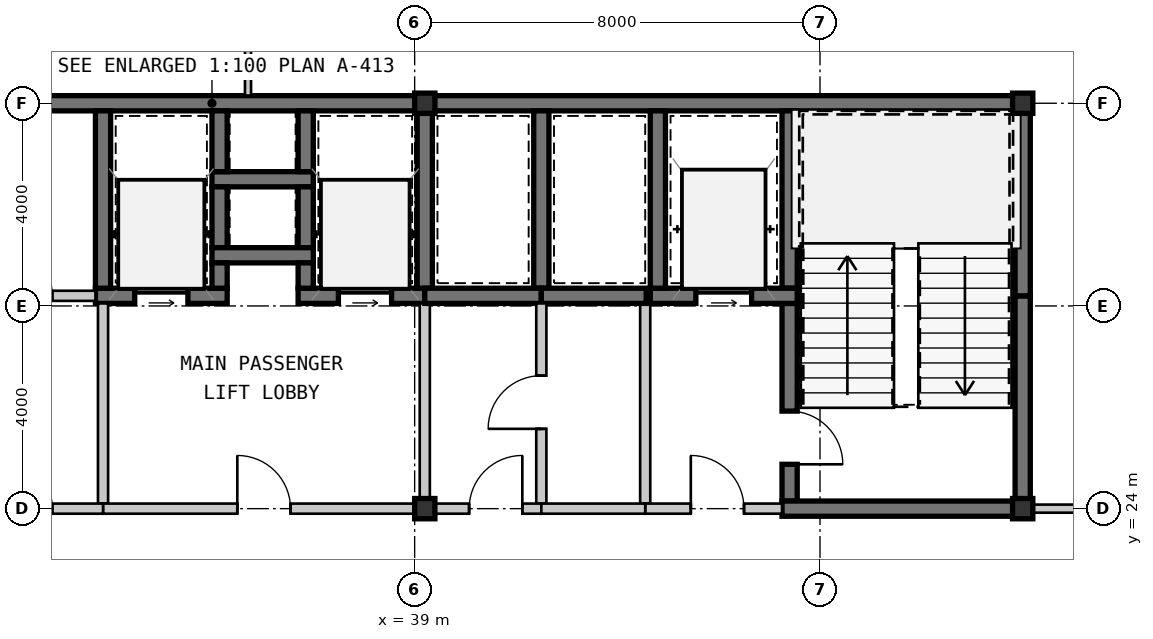
"""IFC4 building model, lengths in metres.
Left out: names, types, materials, properties, quantities, classifications, styles, units other than length and angle.
Written with IfcOpenShell. Run it as: python <this file> out.ifc"""

import sys

from ifc_helpers import new_model, si_unit, direction, frame, frame_2d, origin, origin_2d, place, context, subcontext, project, spatial, rectangle, hollow_rectangle, extrude, source, transform, mapped, element, fill, save


model = new_model("IFC4")
c1 = context("Model", 3, precision=1e-05, world=origin(), true_north=direction((0.0, 1.0)))
c2 = subcontext(c1, "Body", "Model", "MODEL_VIEW")
j1 = project(units=[si_unit("LENGTHUNIT", "METRE"), si_unit("PLANEANGLEUNIT", "RADIAN")], contexts=[c1])
p1 = place(None, origin())
s1 = spatial("IfcSite", under=j1, at=p1, CompositionType="ELEMENT")
p2 = place(p1, origin())
s2 = spatial("IfcBuilding", under=s1, at=p2, CompositionType="ELEMENT")
p3 = place(p2, frame((0.0, 0.0, 120.4)))
s3 = spatial("IfcBuildingStorey", under=s2, at=p3, CompositionType="ELEMENT", Elevation=120.4)
m1 = source(origin(), c2, "Body", "SweptSolid", [
    extrude(hollow_rectangle(XDim=0.4, YDim=0.4, WallThickness=0.016, at=origin_2d()), origin(), (0.0, 0.0, 1.0), 3.15),
])
for number, where, z_axis, x_axis in (
    (1, (39.2, 24.0, 0.0), (0.0, 0.0, 1.0), (1.0, 0.0, 0.0)),
    (2, (51.0, 24.0, 0.0), (0.0, 0.0, 1.0), (1.0, 0.0, 0.0)),
    (3, (39.2, 32.0, 0.0), (0.0, 0.0, 1.0), (1.0, 0.0, 0.0)),
    (4, (51.0, 32.0, 0.0), (0.0, 0.0, 1.0), (1.0, 0.0, 0.0)),
):
    element("IfcColumn", number, at=place(p3, frame(where, z_axis=z_axis, x_axis=x_axis)), inside=s3, PredefinedType="COLUMN", context=c2, shape_type="MappedRepresentation", body=[
        mapped(m1, transform((0.0, 0.0, 0.0), scale=1.0)),
    ])
m2 = source(origin(), c2, "Body", "SweptSolid", [
    extrude(rectangle(XDim=11.2, YDim=0.3, at=frame_2d((5.6, 0.0))), origin(), (0.0, 0.0, 1.0), 2.93),
])
p4 = place(p3, frame((28.0, 32.0, 0.0), z_axis=(0.0, 0.0, 1.0), x_axis=(1.0, 0.0, 0.0)))
e5 = element("IfcWall", 5, at=p4, inside=s3, PredefinedType="SHEAR", context=c2, shape_type="MappedRepresentation", body=[
    mapped(m2, transform((0.0, 0.0, 0.0), scale=1.0)),
])
m3 = source(origin(), c2, "Body", "SweptSolid", [
    extrude(rectangle(XDim=11.95, YDim=0.3, at=frame_2d((5.975, 0.0))), origin(), (0.0, 0.0, 1.0), 2.93),
])
p5 = place(p3, frame((39.2, 32.0, 0.0), z_axis=(0.0, 0.0, 1.0), x_axis=(1.0, 0.0, 0.0)))
e6 = element("IfcWall", 6, at=p5, inside=s3, PredefinedType="SHEAR", context=c2, shape_type="MappedRepresentation", body=[
    mapped(m3, transform((0.0, 0.0, 0.0), scale=1.0)),
])
m4 = source(origin(), c2, "Body", "SweptSolid", [
    extrude(rectangle(XDim=4.05, YDim=0.3, at=frame_2d((2.025, 0.0))), origin(), (0.0, 0.0, 1.0), 2.93),
])
p6 = place(p3, frame((51.0, 24.15, 0.0), z_axis=(0.0, 0.0, 1.0), x_axis=(0.0, 1.0, 0.0)))
e7 = element("IfcWall", 7, at=p6, inside=s3, PredefinedType="SHEAR", context=c2, shape_type="MappedRepresentation", body=[
    mapped(m4, transform((0.0, 0.0, 0.0), scale=1.0)),
])
m5 = source(origin(), c2, "Body", "SweptSolid", [
    extrude(rectangle(XDim=3.65, YDim=0.3, at=frame_2d((1.825, 0.0))), origin(), (0.0, 0.0, 1.0), 2.93),
])
p7 = place(p3, frame((51.0, 28.2, 0.0), z_axis=(0.0, 0.0, 1.0), x_axis=(0.0, 1.0, 0.0)))
e8 = element("IfcWall", 8, at=p7, inside=s3, PredefinedType="SHEAR", context=c2, shape_type="MappedRepresentation", body=[
    mapped(m5, transform((0.0, 0.0, 0.0), scale=1.0)),
])
m6 = source(origin(), c2, "Body", "SweptSolid", [
    extrude(rectangle(XDim=3.5, YDim=0.3, at=frame_2d((1.75, 0.0))), origin(), (0.0, 0.0, 1.0), 2.93),
])
p8 = place(p3, frame((46.4, 31.85, 0.0), z_axis=(0.0, 0.0, 1.0), x_axis=(0.0, -1.0, 0.0)))
e9 = element("IfcWall", 9, at=p8, inside=s3, PredefinedType="SHEAR", context=c2, shape_type="MappedRepresentation", body=[
    mapped(m6, transform((0.0, 0.0, 0.0), scale=1.0)),
])
m7 = source(origin(), c2, "Body", "SweptSolid", [
    extrude(rectangle(XDim=3.9, YDim=0.3, at=frame_2d((1.95, 0.0))), origin(), (0.0, 0.0, 1.0), 2.93),
])
p9 = place(p3, frame((46.4, 28.05, 0.0), z_axis=(0.0, 0.0, 1.0), x_axis=(0.0, -1.0, 0.0)))
e10 = element("IfcWall", 10, at=p9, inside=s3, PredefinedType="SHEAR", context=c2, shape_type="MappedRepresentation", body=[
    mapped(m7, transform((0.0, 0.0, 0.0), scale=1.0)),
])
m8 = source(origin(), c2, "Body", "SweptSolid", [
    extrude(rectangle(XDim=1.05, YDim=2.1, at=frame_2d((0.525, 1.05))), frame((0.0, 0.16, 0.0), z_axis=(0.0, -1.0, 0.0), x_axis=(1.0, 0.0, 0.0)), (0.0, 0.0, 1.0), 0.32),
])
p10 = place(p9, frame((2.125, 0.0, 0.0)))
e11 = element("IfcOpeningElement", 11, at=p10, cuts=e10, PredefinedType="OPENING", context=c2, shape_type="MappedRepresentation", body=[
    mapped(m8, transform((0.0, 0.0, 0.0), scale=1.0)),
])
m9 = source(origin(), c2, "Body", "SweptSolid", [
    extrude(rectangle(XDim=4.9, YDim=0.3, at=frame_2d((2.45, 0.0))), origin(), (0.0, 0.0, 1.0), 2.93),
])
p11 = place(p3, frame((46.25, 24.0, 0.0), z_axis=(0.0, 0.0, 1.0), x_axis=(1.0, 0.0, 0.0)))
e12 = element("IfcWall", 12, at=p11, inside=s3, PredefinedType="SHEAR", context=c2, shape_type="MappedRepresentation", body=[
    mapped(m9, transform((0.0, 0.0, 0.0), scale=1.0)),
])
m10 = source(origin(), c2, "Body", "SweptSolid", [
    extrude(rectangle(XDim=2.9, YDim=0.3, at=frame_2d((1.45, 0.0))), origin(), (0.0, 0.0, 1.0), 2.93),
])
p12 = place(p3, frame((43.65, 28.2, 0.0), z_axis=(0.0, 0.0, 1.0), x_axis=(1.0, 0.0, 0.0)))
e13 = element("IfcWall", 13, at=p12, inside=s3, PredefinedType="SHEAR", context=c2, shape_type="MappedRepresentation", body=[
    mapped(m10, transform((0.0, 0.0, 0.0), scale=1.0)),
])
m11 = source(origin(), c2, "Body", "SweptSolid", [
    extrude(rectangle(XDim=1.1, YDim=2.15, at=frame_2d((0.55, 1.075))), frame((0.0, 0.16, 0.0), z_axis=(0.0, -1.0, 0.0), x_axis=(1.0, 0.0, 0.0)), (0.0, 0.0, 1.0), 0.32),
])
p13 = place(p12, frame((0.9, 0.0, 0.0)))
e14 = element("IfcOpeningElement", 14, at=p13, cuts=e13, PredefinedType="OPENING", context=c2, shape_type="MappedRepresentation", body=[
    mapped(m11, transform((0.0, 0.0, 0.0), scale=1.0)),
])
p14 = place(p3, frame((43.8, 31.85, 0.0), z_axis=(0.0, 0.0, 1.0), x_axis=(0.0, -1.0, 0.0)))
e15 = element("IfcWall", 15, at=p14, inside=s3, PredefinedType="SHEAR", context=c2, shape_type="MappedRepresentation", body=[
    mapped(m6, transform((0.0, 0.0, 0.0), scale=1.0)),
])
m12 = source(origin(), c2, "Body", "SweptSolid", [
    extrude(rectangle(XDim=3.95, YDim=0.2, at=frame_2d((1.975, 0.0))), origin(), (0.0, 0.0, 1.0), 2.93),
])
p15 = place(p3, frame((43.55, 28.05, 0.0), z_axis=(0.0, 0.0, 1.0), x_axis=(0.0, -1.0, 0.0)))
e16 = element("IfcWall", 16, at=p15, inside=s3, PredefinedType="SOLIDWALL", context=c2, shape_type="MappedRepresentation", body=[
    mapped(m12, transform((0.0, 0.0, 0.0), scale=1.0)),
])
m13 = source(origin(), c2, "Body", "SweptSolid", [
    extrude(rectangle(XDim=2.7, YDim=0.2, at=frame_2d((1.35, 0.0))), origin(), (0.0, 0.0, 1.0), 2.397),
])
p16 = place(p3, frame((43.55, 24.0, 0.0), z_axis=(0.0, 0.0, 1.0), x_axis=(1.0, 0.0, 0.0)))
e17 = element("IfcWall", 17, at=p16, inside=s3, PredefinedType="SOLIDWALL", context=c2, shape_type="MappedRepresentation", body=[
    mapped(m13, transform((0.0, 0.0, 0.0), scale=1.0)),
])
m14 = source(origin(), c2, "Body", "SweptSolid", [
    extrude(rectangle(XDim=1.05, YDim=2.1, at=frame_2d((0.525, 1.05))), frame((0.0, 0.11, 0.0), z_axis=(0.0, -1.0, 0.0), x_axis=(1.0, 0.0, 0.0)), (0.0, 0.0, 1.0), 0.22),
])
p17 = place(p16, frame((0.9, 0.0, 0.0)))
e18 = element("IfcOpeningElement", 18, at=p17, cuts=e17, PredefinedType="OPENING", context=c2, shape_type="MappedRepresentation", body=[
    mapped(m14, transform((0.0, 0.0, 0.0), scale=1.0)),
])
m15 = source(origin(), c2, "Body", "SweptSolid", [
    extrude(rectangle(XDim=2.0, YDim=0.3, at=frame_2d((1.0, 0.0))), origin(), (0.0, 0.0, 1.0), 2.93),
])
p18 = place(p3, frame((35.0, 30.5, 0.0), z_axis=(0.0, 0.0, 1.0), x_axis=(1.0, 0.0, 0.0)))
e19 = element("IfcWall", 19, at=p18, inside=s3, PredefinedType="SHEAR", context=c2, shape_type="MappedRepresentation", body=[
    mapped(m15, transform((0.0, 0.0, 0.0), scale=1.0)),
])
m16 = source(origin(), c2, "Body", "SweptSolid", [
    extrude(rectangle(XDim=1.2, YDim=0.3, at=frame_2d((0.6, 0.0))), origin(), (0.0, 0.0, 1.0), 2.93),
])
for number, where, z_axis, x_axis in (
    (20, (35.15, 31.85, 0.0), (0.0, 0.0, 1.0), (0.0, -1.0, 0.0)),
    (21, (36.85, 30.65, 0.0), (0.0, 0.0, 1.0), (0.0, 1.0, 0.0)),
    (22, (35.15, 30.35, 0.0), (0.0, 0.0, 1.0), (0.0, -1.0, 0.0)),
    (23, (36.85, 29.15, 0.0), (0.0, 0.0, 1.0), (0.0, 1.0, 0.0)),
):
    element("IfcWall", number, at=place(p3, frame(where, z_axis=z_axis, x_axis=x_axis)), inside=s3, PredefinedType="SHEAR", context=c2, shape_type="MappedRepresentation", body=[
        mapped(m16, transform((0.0, 0.0, 0.0), scale=1.0)),
    ])
p19 = place(p3, frame((35.0, 29.0, 0.0), z_axis=(0.0, 0.0, 1.0), x_axis=(1.0, 0.0, 0.0)))
e24 = element("IfcWall", 24, at=p19, inside=s3, PredefinedType="SHEAR", context=c2, shape_type="MappedRepresentation", body=[
    mapped(m15, transform((0.0, 0.0, 0.0), scale=1.0)),
])
m17 = source(origin(), c2, "Body", "SweptSolid", [
    extrude(rectangle(XDim=2.6, YDim=0.3, at=frame_2d((1.3, 0.0))), origin(), (0.0, 0.0, 1.0), 2.93),
])
p20 = place(p3, frame((32.7, 28.2, 0.0), z_axis=(0.0, 0.0, 1.0), x_axis=(1.0, 0.0, 0.0)))
e25 = element("IfcWall", 25, at=p20, inside=s3, PredefinedType="SHEAR", context=c2, shape_type="MappedRepresentation", body=[
    mapped(m17, transform((0.0, 0.0, 0.0), scale=1.0)),
])
m18 = source(origin(), c2, "Body", "SweptSolid", [
    extrude(rectangle(XDim=1.05, YDim=2.15, at=frame_2d((0.525, 1.075))), frame((0.0, 0.16, 0.0), z_axis=(0.0, -1.0, 0.0), x_axis=(1.0, 0.0, 0.0)), (0.0, 0.0, 1.0), 0.32),
])
p21 = place(p20, frame((0.775, 0.0, 0.0)))
e26 = element("IfcOpeningElement", 26, at=p21, cuts=e25, PredefinedType="OPENING", context=c2, shape_type="MappedRepresentation", body=[
    mapped(m18, transform((0.0, 0.0, 0.0), scale=1.0)),
])
m19 = source(origin(), c2, "Body", "SweptSolid", [
    extrude(rectangle(XDim=0.5, YDim=0.3, at=frame_2d((0.25, 0.0))), origin(), (0.0, 0.0, 1.0), 2.93),
])
p22 = place(p3, frame((35.15, 28.35, 0.0), z_axis=(0.0, 0.0, 1.0), x_axis=(0.0, 1.0, 0.0)))
e27 = element("IfcWall", 27, at=p22, inside=s3, PredefinedType="SHEAR", context=c2, shape_type="MappedRepresentation", body=[
    mapped(m19, transform((0.0, 0.0, 0.0), scale=1.0)),
])
p23 = place(p3, frame((32.85, 31.85, 0.0), z_axis=(0.0, 0.0, 1.0), x_axis=(0.0, -1.0, 0.0)))
e28 = element("IfcWall", 28, at=p23, inside=s3, PredefinedType="SHEAR", context=c2, shape_type="MappedRepresentation", body=[
    mapped(m6, transform((0.0, 0.0, 0.0), scale=1.0)),
])
m20 = source(origin(), c2, "Body", "SweptSolid", [
    extrude(rectangle(XDim=2.5, YDim=0.3, at=frame_2d((1.25, 0.0))), origin(), (0.0, 0.0, 1.0), 2.93),
])
p24 = place(p3, frame((36.7, 28.2, 0.0), z_axis=(0.0, 0.0, 1.0), x_axis=(1.0, 0.0, 0.0)))
e29 = element("IfcWall", 29, at=p24, inside=s3, PredefinedType="SHEAR", context=c2, shape_type="MappedRepresentation", body=[
    mapped(m20, transform((0.0, 0.0, 0.0), scale=1.0)),
])
p25 = place(p24, frame((0.795, 0.0, 0.0)))
e30 = element("IfcOpeningElement", 30, at=p25, cuts=e29, PredefinedType="OPENING", context=c2, shape_type="MappedRepresentation", body=[
    mapped(m18, transform((0.0, 0.0, 0.0), scale=1.0)),
])
p26 = place(p3, frame((36.85, 28.85, 0.0), z_axis=(0.0, 0.0, 1.0), x_axis=(0.0, -1.0, 0.0)))
e31 = element("IfcWall", 31, at=p26, inside=s3, PredefinedType="SHEAR", context=c2, shape_type="MappedRepresentation", body=[
    mapped(m19, transform((0.0, 0.0, 0.0), scale=1.0)),
])
p27 = place(p3, frame((39.2, 28.35, 0.0), z_axis=(0.0, 0.0, 1.0), x_axis=(0.0, 1.0, 0.0)))
e32 = element("IfcWall", 32, at=p27, inside=s3, PredefinedType="SHEAR", context=c2, shape_type="MappedRepresentation", body=[
    mapped(m6, transform((0.0, 0.0, 0.0), scale=1.0)),
])
p28 = place(p3, frame((32.85, 24.1, 0.0), z_axis=(0.0, 0.0, 1.0), x_axis=(0.0, 1.0, 0.0)))
e33 = element("IfcWall", 33, at=p28, inside=s3, PredefinedType="SOLIDWALL", context=c2, shape_type="MappedRepresentation", body=[
    mapped(m12, transform((0.0, 0.0, 0.0), scale=1.0)),
])
m21 = source(origin(), c2, "Body", "SweptSolid", [
    extrude(rectangle(XDim=3.95, YDim=0.2, at=frame_2d((1.975, 0.0))), origin(), (0.0, 0.0, 1.0), 2.47),
])
p29 = place(p3, frame((39.2, 28.05, 0.0), z_axis=(0.0, 0.0, 1.0), x_axis=(0.0, -1.0, 0.0)))
e34 = element("IfcWall", 34, at=p29, inside=s3, PredefinedType="SOLIDWALL", context=c2, shape_type="MappedRepresentation", body=[
    mapped(m21, transform((0.0, 0.0, 0.0), scale=1.0)),
])
m22 = source(origin(), c2, "Body", "SweptSolid", [
    extrude(rectangle(XDim=6.35, YDim=0.2, at=frame_2d((3.175, 0.0))), origin(), (0.0, 0.0, 1.0), 2.47),
])
p30 = place(p3, frame((39.2, 24.0, 0.0), z_axis=(0.0, 0.0, 1.0), x_axis=(-1.0, 0.0, 0.0)))
e35 = element("IfcWall", 35, at=p30, inside=s3, PredefinedType="SOLIDWALL", context=c2, shape_type="MappedRepresentation", body=[
    mapped(m22, transform((0.0, 0.0, 0.0), scale=1.0)),
])
p31 = place(p30, frame((2.65, 0.0, 0.0)))
e36 = element("IfcOpeningElement", 36, at=p31, cuts=e35, PredefinedType="OPENING", context=c2, shape_type="MappedRepresentation", body=[
    mapped(m14, transform((0.0, 0.0, 0.0), scale=1.0)),
])
p32 = place(p3, frame((41.5, 28.35, 0.0), z_axis=(0.0, 0.0, 1.0), x_axis=(0.0, 1.0, 0.0)))
e37 = element("IfcWall", 37, at=p32, inside=s3, PredefinedType="SHEAR", context=c2, shape_type="MappedRepresentation", body=[
    mapped(m6, transform((0.0, 0.0, 0.0), scale=1.0)),
])
m23 = source(origin(), c2, "Body", "SweptSolid", [
    extrude(rectangle(XDim=2.3, YDim=0.3, at=frame_2d((1.15, 0.0))), origin(), (0.0, 0.0, 1.0), 2.93),
])
p33 = place(p3, frame((39.2, 28.2, 0.0), z_axis=(0.0, 0.0, 1.0), x_axis=(1.0, 0.0, 0.0)))
e38 = element("IfcWall", 38, at=p33, inside=s3, PredefinedType="SHEAR", context=c2, shape_type="MappedRepresentation", body=[
    mapped(m23, transform((0.0, 0.0, 0.0), scale=1.0)),
])
m24 = source(origin(), c2, "Body", "SweptSolid", [
    extrude(rectangle(XDim=2.07, YDim=0.3, at=frame_2d((1.035, 0.0))), origin(), (0.0, 0.0, 1.0), 2.93),
])
p34 = place(p3, frame((41.5, 28.2, 0.0), z_axis=(0.0, 0.0, 1.0), x_axis=(1.0, 0.0, 0.0)))
e39 = element("IfcWall", 39, at=p34, inside=s3, PredefinedType="SHEAR", context=c2, shape_type="MappedRepresentation", body=[
    mapped(m24, transform((0.0, 0.0, 0.0), scale=1.0)),
])
m25 = source(origin(), c2, "Body", "SweptSolid", [
    extrude(rectangle(XDim=2.9, YDim=0.2, at=frame_2d((1.45, 0.0))), origin(), (0.0, 0.0, 1.0), 2.93),
])
p35 = place(p3, frame((29.8, 28.2, 0.0), z_axis=(0.0, 0.0, 1.0), x_axis=(1.0, 0.0, 0.0)))
e40 = element("IfcWall", 40, at=p35, inside=s3, PredefinedType="SOLIDWALL", context=c2, shape_type="MappedRepresentation", body=[
    mapped(m25, transform((0.0, 0.0, 0.0), scale=1.0)),
])
p36 = place(p35, frame((1.0, 0.0, 0.0)))
e41 = element("IfcOpeningElement", 41, at=p36, cuts=e40, PredefinedType="OPENING", context=c2, shape_type="MappedRepresentation", body=[
    mapped(m14, transform((0.0, 0.0, 0.0), scale=1.0)),
])
m26 = source(origin(), c2, "Body", "SweptSolid", [
    extrude(rectangle(XDim=3.05, YDim=0.2, at=frame_2d((1.525, 0.0))), origin(), (0.0, 0.0, 1.0), 2.47),
])
p37 = place(p3, frame((32.85, 24.0, 0.0), z_axis=(0.0, 0.0, 1.0), x_axis=(-1.0, 0.0, 0.0)))
e42 = element("IfcWall", 42, at=p37, inside=s3, PredefinedType="SOLIDWALL", context=c2, shape_type="MappedRepresentation", body=[
    mapped(m26, transform((0.0, 0.0, 0.0), scale=1.0)),
])
p38 = place(p37, frame((1.0, 0.0, 0.0)))
e43 = element("IfcOpeningElement", 43, at=p38, cuts=e42, PredefinedType="OPENING", context=c2, shape_type="MappedRepresentation", body=[
    mapped(m14, transform((0.0, 0.0, 0.0), scale=1.0)),
])
p39 = place(p3, frame((41.5, 28.05, 0.0), z_axis=(0.0, 0.0, 1.0), x_axis=(0.0, -1.0, 0.0)))
e44 = element("IfcWall", 44, at=p39, inside=s3, PredefinedType="SOLIDWALL", context=c2, shape_type="MappedRepresentation", body=[
    mapped(m12, transform((0.0, 0.0, 0.0), scale=1.0)),
])
p40 = place(p39, frame((1.425, 0.0, 0.0)))
e45 = element("IfcOpeningElement", 45, at=p40, cuts=e44, PredefinedType="OPENING", context=c2, shape_type="MappedRepresentation", body=[
    mapped(m14, transform((0.0, 0.0, 0.0), scale=1.0)),
])
m27 = source(origin(), c2, "Body", "SweptSolid", [
    extrude(rectangle(XDim=2.3, YDim=0.2, at=frame_2d((1.15, 0.0))), origin(), (0.0, 0.0, 1.0), 2.397),
])
p41 = place(p3, frame((41.5, 24.0, 0.0), z_axis=(0.0, 0.0, 1.0), x_axis=(-1.0, 0.0, 0.0)))
e46 = element("IfcWall", 46, at=p41, inside=s3, PredefinedType="SOLIDWALL", context=c2, shape_type="MappedRepresentation", body=[
    mapped(m27, transform((0.0, 0.0, 0.0), scale=1.0)),
])
p42 = place(p41, frame((0.375, 0.0, 0.0)))
e47 = element("IfcOpeningElement", 47, at=p42, cuts=e46, PredefinedType="OPENING", context=c2, shape_type="MappedRepresentation", body=[
    mapped(m14, transform((0.0, 0.0, 0.0), scale=1.0)),
])
m28 = source(origin(), c2, "Body", "SweptSolid", [
    extrude(rectangle(XDim=2.05, YDim=0.2, at=frame_2d((1.025, 0.0))), origin(), (0.0, 0.0, 1.0), 2.397),
])
p43 = place(p3, frame((43.55, 24.0, 0.0), z_axis=(0.0, 0.0, 1.0), x_axis=(-1.0, 0.0, 0.0)))
e48 = element("IfcWall", 48, at=p43, inside=s3, PredefinedType="SOLIDWALL", context=c2, shape_type="MappedRepresentation", body=[
    mapped(m28, transform((0.0, 0.0, 0.0), scale=1.0)),
])
m29 = source(origin(), c2, "Body", "SweptSolid", [
    extrude(rectangle(XDim=10.1, YDim=0.16, at=frame_2d((5.05, 0.0))), origin(), (0.0, 0.0, 1.0), 2.93),
])
p44 = place(p3, frame((51.15, 24.0, 0.0), z_axis=(0.0, 0.0, 1.0), x_axis=(1.0, 0.0, 0.0)))
e49 = element("IfcWall", 49, at=p44, inside=s3, PredefinedType="PARTITIONING", context=c2, shape_type="MappedRepresentation", body=[
    mapped(m29, transform((0.0, 0.0, 0.0), scale=1.0)),
])
m30 = source(origin(), c2, "Body", "SweptSolid", [
    extrude(rectangle(XDim=0.92, YDim=2.1, at=frame_2d((0.46, 1.05))), frame((0.0, 0.09, 0.0), z_axis=(0.0, -1.0, 0.0), x_axis=(1.0, 0.0, 0.0)), (0.0, 0.0, 1.0), 0.18),
])
p45 = place(p44, frame((4.525, 0.0, 0.0)))
e50 = element("IfcOpeningElement", 50, at=p45, cuts=e49, PredefinedType="OPENING", context=c2, shape_type="MappedRepresentation", body=[
    mapped(m30, transform((0.0, 0.0, 0.0), scale=1.0)),
])
m31 = source(origin(), c2, "Body", "SweptSolid", [
    extrude(rectangle(XDim=4.727, YDim=0.12, at=frame_2d((2.364, 0.0))), origin(), (0.0, 0.0, 1.0), 2.93),
])
p46 = place(p3, frame((35.711, 36.877, 0.0), z_axis=(0.0, 0.0, 1.0), x_axis=(0.0, -1.0, 0.0)))
e51 = element("IfcWall", 51, at=p46, inside=s3, PredefinedType="PARTITIONING", context=c2, shape_type="MappedRepresentation", body=[
    mapped(m31, transform((0.0, 0.0, 0.0), scale=1.0)),
])
m32 = source(origin(), c2, "Body", "SweptSolid", [
    extrude(rectangle(XDim=1.05, YDim=2.1, at=frame_2d((0.525, 1.05))), frame((0.0, 0.025, 0.0), z_axis=(0.0, -1.0, 0.0), x_axis=(1.0, 0.0, 0.0)), (0.0, 0.0, 1.0), 0.05),
])
p47 = place(p10, origin())
e52 = element("IfcDoor", 52, at=p47, inside=s3, OperationType="SINGLE_SWING_RIGHT", PredefinedType="DOOR", context=c2, shape_type="MappedRepresentation", body=[
    mapped(m32, transform((0.0, 0.0, 0.0), scale=1.0)),
])
fill(e11, e52)
m33 = source(origin(), c2, "Body", "SweptSolid", [
    extrude(rectangle(XDim=1.1, YDim=2.15, at=frame_2d((0.55, 1.075))), frame((0.0, 0.025, 0.0), z_axis=(0.0, -1.0, 0.0), x_axis=(1.0, 0.0, 0.0)), (0.0, 0.0, 1.0), 0.05),
])
p48 = place(p13, origin())
e53 = element("IfcDoor", 53, at=p48, inside=s3, OperationType="SLIDING_TO_LEFT", PredefinedType="DOOR", context=c2, shape_type="MappedRepresentation", body=[
    mapped(m33, transform((0.0, 0.0, 0.0), scale=1.0)),
])
fill(e14, e53)
p49 = place(p17, origin())
e54 = element("IfcDoor", 54, at=p49, inside=s3, OperationType="SINGLE_SWING_LEFT", PredefinedType="DOOR", context=c2, shape_type="MappedRepresentation", body=[
    mapped(m32, transform((0.0, 0.0, 0.0), scale=1.0)),
])
fill(e18, e54)
m34 = source(origin(), c2, "Body", "SweptSolid", [
    extrude(rectangle(XDim=1.05, YDim=2.15, at=frame_2d((0.525, 1.075))), frame((0.0, 0.025, 0.0), z_axis=(0.0, -1.0, 0.0), x_axis=(1.0, 0.0, 0.0)), (0.0, 0.0, 1.0), 0.05),
])
p50 = place(p21, origin())
e55 = element("IfcDoor", 55, at=p50, inside=s3, OperationType="SLIDING_TO_LEFT", PredefinedType="DOOR", context=c2, shape_type="MappedRepresentation", body=[
    mapped(m34, transform((0.0, 0.0, 0.0), scale=1.0)),
])
fill(e26, e55)
p51 = place(p25, origin())
e56 = element("IfcDoor", 56, at=p51, inside=s3, OperationType="SLIDING_TO_LEFT", PredefinedType="DOOR", context=c2, shape_type="MappedRepresentation", body=[
    mapped(m34, transform((0.0, 0.0, 0.0), scale=1.0)),
])
fill(e30, e56)
p52 = place(p31, frame((1.05, 0.0, 0.0), z_axis=(0.0, 0.0, 1.0), x_axis=(-1.0, 0.0, 0.0)))
e57 = element("IfcDoor", 57, at=p52, inside=s3, OperationType="SINGLE_SWING_LEFT", PredefinedType="DOOR", context=c2, shape_type="MappedRepresentation", body=[
    mapped(m32, transform((0.0, 0.0, 0.0), scale=1.0)),
])
fill(e36, e57)
p53 = place(p40, frame((1.05, 0.0, 0.0), z_axis=(0.0, 0.0, 1.0), x_axis=(-1.0, 0.0, 0.0)))
e58 = element("IfcDoor", 58, at=p53, inside=s3, OperationType="SINGLE_SWING_LEFT", PredefinedType="DOOR", context=c2, shape_type="MappedRepresentation", body=[
    mapped(m32, transform((0.0, 0.0, 0.0), scale=1.0)),
])
fill(e45, e58)
p54 = place(p42, frame((1.05, 0.0, 0.0), z_axis=(0.0, 0.0, 1.0), x_axis=(-1.0, 0.0, 0.0)))
e59 = element("IfcDoor", 59, at=p54, inside=s3, OperationType="SINGLE_SWING_RIGHT", PredefinedType="DOOR", context=c2, shape_type="MappedRepresentation", body=[
    mapped(m32, transform((0.0, 0.0, 0.0), scale=1.0)),
])
fill(e47, e59)
save(model, sys.argv[1])
